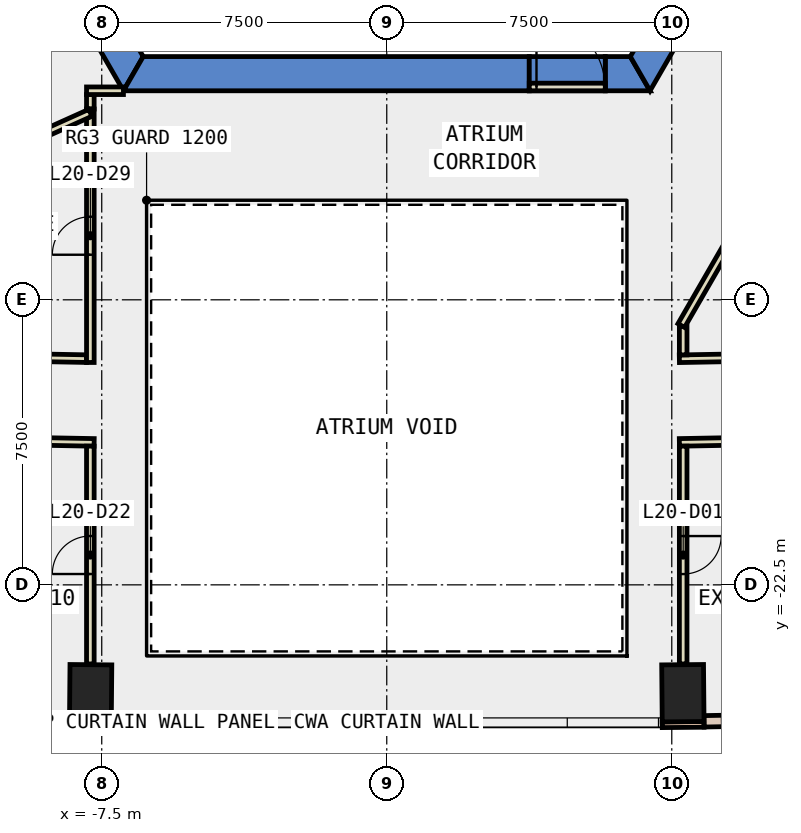
"""IFC4 building model, lengths in metres.
Left out: names, types, materials, properties, quantities, classifications, styles, units other than length and angle.
Written with IfcOpenShell. Run it as: python <this file> out.ifc"""

import sys

from ifc_helpers import new_model, si_unit, direction, frame, frame_2d, origin, origin_2d, place, context, subcontext, project, spatial, polyline, rectangle, outline, extrude, element, fill, save


model = new_model("IFC4")
c1 = context("Model", 3, precision=1e-05, world=origin(), true_north=direction((0.0, 1.0)))
c2 = subcontext(c1, "Body", "Model", "MODEL_VIEW")
j1 = project(units=[si_unit("LENGTHUNIT", "METRE"), si_unit("PLANEANGLEUNIT", "RADIAN")], contexts=[c1])
p1 = place(None, origin())
s1 = spatial("IfcSite", under=j1, at=p1, CompositionType="ELEMENT")
p2 = place(p1, origin())
s2 = spatial("IfcBuilding", under=s1, at=p2, CompositionType="ELEMENT")
p3 = place(p2, frame((0.0, 0.0, 95.0)))
s3 = spatial("IfcBuildingStorey", under=s2, at=p3, CompositionType="ELEMENT", Elevation=95.0)
for number, where, z_axis, x_axis in (
    (1, (-7.792, -25.351, -0.4), (0.0, 0.0, 1.0), (-1.0, 0.009, 0.0)),
    (2, (7.792, -25.351, -0.4), (0.0, 0.0, 1.0), (1.0, 0.009, 0.0)),
):
    element("IfcColumn", number, at=place(p3, frame(where, z_axis=z_axis, x_axis=x_axis)), inside=s3, PredefinedType="COLUMN", context=c2, shape_type="SweptSolid", body=[
        extrude(rectangle(XDim=1.1, YDim=1.5, at=origin_2d()), origin(), (0.0, 0.0, 1.0), 4.2),
    ])
p4 = place(p3, frame((0.0, 0.0, -0.4)))
e3 = element("IfcWall", 3, at=p4, inside=s3, PredefinedType="SHEAR", context=c2, shape_type="SweptSolid", body=[
    extrude(outline(polyline([(-13.856, 2.5), (-6.928, -9.5), (-6.409, -8.6), (-12.817, 2.5), (-13.856, 2.5)])), origin(), (0.0, 0.0, 1.0), 4.2),
])
p5 = place(p3, frame((0.0, 0.0, -0.4)))
e4 = element("IfcWall", 4, at=p5, inside=s3, PredefinedType="SHEAR", context=c2, shape_type="SweptSolid", body=[
    extrude(outline(polyline([(3.75, -9.5), (3.75, -8.6), (-6.409, -8.6), (-6.928, -9.5), (3.75, -9.5)])), origin(), (0.0, 0.0, 1.0), 4.2),
])
p6 = place(p3, frame((0.0, 0.0, -0.4)))
e5 = element("IfcWall", 5, at=p6, inside=s3, PredefinedType="SHEAR", context=c2, shape_type="SweptSolid", body=[
    extrude(outline(polyline([(5.75, -8.6), (5.75, -9.5), (6.928, -9.5), (6.409, -8.6), (5.75, -8.6)])), origin(), (0.0, 0.0, 1.0), 4.2),
])
p7 = place(p3, frame((0.0, 0.0, 3.6)))
e6 = element("IfcWall", 6, at=p7, inside=s3, PredefinedType="SHEAR", context=c2, shape_type="SweptSolid", body=[
    extrude(outline(polyline([(5.75, -9.5), (5.75, -8.6), (3.75, -8.6), (3.75, -9.5), (5.75, -9.5)])), origin(), (0.0, 0.0, 1.0), 0.2),
])
p8 = place(p3, frame((0.0, 0.0, -0.4)))
e7 = element("IfcWall", 7, at=p8, inside=s3, PredefinedType="SHEAR", context=c2, shape_type="SweptSolid", body=[
    extrude(outline(polyline([(8.117, -7.44), (7.338, -6.99), (6.409, -8.6), (6.928, -9.5), (8.117, -7.44)])), origin(), (0.0, 0.0, 1.0), 4.2),
])
for number, where, z_axis, x_axis in (
    (8, (-8.349, -26.171, 0.0), (0.0, 0.0, 1.0), (1.0, -0.009, 0.0)),
    (9, (7.249, -26.181, 0.0), (0.0, 0.0, 1.0), (1.0, 0.009, 0.0)),
):
    element("IfcWall", number, at=place(p3, frame(where, z_axis=z_axis, x_axis=x_axis)), inside=s3, PredefinedType="STANDARD", context=c2, shape_type="SweptSolid", body=[
        extrude(rectangle(XDim=1.1, YDim=0.15, at=frame_2d((0.55, 0.0))), origin(), (0.0, 0.0, 1.0), 3.8),
    ])
p9 = place(p3, frame((-14.242, -25.982, 0.0), z_axis=(0.0, 0.0, 1.0), x_axis=(0.999828633111, -0.018512277318, 0.0)))
e10 = element("IfcWall", 10, at=p9, inside=s3, PredefinedType="STANDARD", context=c2, shape_type="SweptSolid", body=[
    extrude(rectangle(XDim=5.895, YDim=0.3, at=frame_2d((2.948, 0.0))), origin(), (0.0, 0.0, 1.0), 3.8),
])
p10 = place(p9, frame((0.474, 0.0, 0.9)))
e11 = element("IfcOpeningElement", 11, at=p10, cuts=e10, PredefinedType="OPENING", context=c2, shape_type="SweptSolid", body=[
    extrude(rectangle(XDim=2.0, YDim=2.6, at=frame_2d((1.0, 1.3))), frame((0.0, 0.16, 0.0), z_axis=(0.0, -1.0, 0.0), x_axis=(1.0, 0.0, 0.0)), (0.0, 0.0, 1.0), 0.32),
])
p11 = place(p9, frame((3.421, 0.0, 0.9)))
e12 = element("IfcOpeningElement", 12, at=p11, cuts=e10, PredefinedType="OPENING", context=c2, shape_type="SweptSolid", body=[
    extrude(rectangle(XDim=2.0, YDim=2.6, at=frame_2d((1.0, 1.3))), frame((0.0, 0.16, 0.0), z_axis=(0.0, -1.0, 0.0), x_axis=(1.0, 0.0, 0.0)), (0.0, 0.0, 1.0), 0.32),
])
p12 = place(p3, frame((8.348, -26.091, 0.0), z_axis=(0.0, 0.0, 1.0), x_axis=(0.999828633111, 0.018512277318, 0.0)))
e13 = element("IfcWall", 13, at=p12, inside=s3, PredefinedType="STANDARD", context=c2, shape_type="SweptSolid", body=[
    extrude(rectangle(XDim=5.895, YDim=0.3, at=frame_2d((2.948, 0.0))), origin(), (0.0, 0.0, 1.0), 3.8),
])
p13 = place(p12, frame((0.474, 0.0, 0.9)))
e14 = element("IfcOpeningElement", 14, at=p13, cuts=e13, PredefinedType="OPENING", context=c2, shape_type="SweptSolid", body=[
    extrude(rectangle(XDim=2.0, YDim=2.6, at=frame_2d((1.0, 1.3))), frame((0.0, 0.16, 0.0), z_axis=(0.0, -1.0, 0.0), x_axis=(1.0, 0.0, 0.0)), (0.0, 0.0, 1.0), 0.32),
])
p14 = place(p12, frame((3.421, 0.0, 0.9)))
e15 = element("IfcOpeningElement", 15, at=p14, cuts=e13, PredefinedType="OPENING", context=c2, shape_type="SweptSolid", body=[
    extrude(rectangle(XDim=2.0, YDim=2.6, at=frame_2d((1.0, 1.3))), frame((0.0, 0.16, 0.0), z_axis=(0.0, -1.0, 0.0), x_axis=(1.0, 0.0, 0.0)), (0.0, 0.0, 1.0), 0.32),
])
p15 = place(p3, frame((7.7, -16.551, 0.0), z_axis=(0.0, 0.0, 1.0), x_axis=(0.999831478914, 0.018357934851, 0.0)))
e16 = element("IfcWall", 16, at=p15, inside=s3, PredefinedType="PARTITIONING", context=c2, shape_type="SweptSolid", body=[
    extrude(rectangle(XDim=6.862, YDim=0.2, at=frame_2d((3.431, 0.0))), origin(), (0.0, 0.0, 1.0), 3.8),
])
p16 = place(p3, frame((-10.408, -16.501, 0.0), z_axis=(0.0, 0.0, 1.0), x_axis=(0.999823568917, -0.018783797216, 0.0)))
e17 = element("IfcWall", 17, at=p16, inside=s3, PredefinedType="PARTITIONING", context=c2, shape_type="SweptSolid", body=[
    extrude(rectangle(XDim=2.509, YDim=0.2, at=frame_2d((1.254, 0.0))), origin(), (0.0, 0.0, 1.0), 3.8),
])
p17 = place(p3, frame((14.689, -18.623, 0.0), z_axis=(0.0, 0.0, 1.0), x_axis=(-0.99982995049, -0.01844098976, 0.0)))
e18 = element("IfcWall", 18, at=p17, inside=s3, PredefinedType="PARTITIONING", context=c2, shape_type="SweptSolid", body=[
    extrude(rectangle(XDim=6.99, YDim=0.2, at=frame_2d((3.495, 0.0))), origin(), (0.0, 0.0, 1.0), 3.8),
])
p18 = place(p3, frame((-7.7, -18.752, 0.0), z_axis=(0.0, 0.0, 1.0), x_axis=(-0.999830394604, 0.018416895142, 0.0)))
e19 = element("IfcWall", 19, at=p18, inside=s3, PredefinedType="PARTITIONING", context=c2, shape_type="SweptSolid", body=[
    extrude(rectangle(XDim=6.84, YDim=0.2, at=frame_2d((3.42, 0.0))), origin(), (0.0, 0.0, 1.0), 3.8),
])
p19 = place(p3, frame((7.8, -15.69, 0.0), z_axis=(0.0, 0.0, 1.0), x_axis=(0.0, -1.0, 0.0)))
e20 = element("IfcWall", 20, at=p19, inside=s3, PredefinedType="PARTITIONING", context=c2, shape_type="SweptSolid", body=[
    extrude(rectangle(XDim=0.759, YDim=0.2, at=frame_2d((0.379, 0.0))), origin(), (0.0, 0.0, 1.0), 3.8),
])
p20 = place(p3, frame((-7.8, -9.98, 0.0), z_axis=(0.0, 0.0, 1.0), x_axis=(0.0, 1.0, 0.0)))
e21 = element("IfcWall", 21, at=p20, inside=s3, PredefinedType="PARTITIONING", context=c2, shape_type="SweptSolid", body=[
    extrude(rectangle(XDim=0.381, YDim=0.2, at=frame_2d((0.19, 0.0))), origin(), (0.0, 0.0, 1.0), 3.8),
])
p21 = place(p3, frame((-7.9, -9.499, 0.0), z_axis=(0.0, 0.0, 1.0), x_axis=(1.0, 0.0, 0.0)))
e22 = element("IfcWall", 22, at=p21, inside=s3, PredefinedType="PARTITIONING", context=c2, shape_type="SweptSolid", body=[
    extrude(rectangle(XDim=0.971, YDim=0.2, at=frame_2d((0.485, 0.0))), origin(), (0.0, 0.0, 1.0), 3.8),
])
p22 = place(p3, frame((-7.8, -16.649, 0.0), z_axis=(0.0, 0.0, 1.0), x_axis=(0.0, 1.0, 0.0)))
e23 = element("IfcWall", 23, at=p22, inside=s3, PredefinedType="PARTITIONING", context=c2, shape_type="SweptSolid", body=[
    extrude(rectangle(XDim=6.669, YDim=0.2, at=frame_2d((3.334, 0.0))), origin(), (0.0, 0.0, 1.0), 3.8),
])
p23 = place(p22, frame((2.835, 0.0, 0.0)))
e24 = element("IfcOpeningElement", 24, at=p23, cuts=e23, PredefinedType="OPENING", context=c2, shape_type="SweptSolid", body=[
    extrude(rectangle(XDim=1.0, YDim=2.1, at=frame_2d((0.5, 1.05))), frame((0.0, 0.11, 0.0), z_axis=(0.0, -1.0, 0.0), x_axis=(1.0, 0.0, 0.0)), (0.0, 0.0, 1.0), 0.22),
])
p24 = place(p3, frame((7.8, -18.85, 0.0), z_axis=(0.0, 0.0, 1.0), x_axis=(0.0, -1.0, 0.0)))
e25 = element("IfcWall", 25, at=p24, inside=s3, PredefinedType="PARTITIONING", context=c2, shape_type="SweptSolid", body=[
    extrude(rectangle(XDim=5.731, YDim=0.2, at=frame_2d((2.865, 0.0))), origin(), (0.0, 0.0, 1.0), 3.8),
])
p25 = place(p24, frame((2.366, 0.0, 0.0)))
e26 = element("IfcOpeningElement", 26, at=p25, cuts=e25, PredefinedType="OPENING", context=c2, shape_type="SweptSolid", body=[
    extrude(rectangle(XDim=1.0, YDim=2.1, at=frame_2d((0.5, 1.05))), frame((0.0, 0.11, 0.0), z_axis=(0.0, -1.0, 0.0), x_axis=(1.0, 0.0, 0.0)), (0.0, 0.0, 1.0), 0.22),
])
p26 = place(p3, frame((-7.8, -24.581, 0.0), z_axis=(0.0, 0.0, 1.0), x_axis=(0.0, 1.0, 0.0)))
e27 = element("IfcWall", 27, at=p26, inside=s3, PredefinedType="PARTITIONING", context=c2, shape_type="SweptSolid", body=[
    extrude(rectangle(XDim=5.731, YDim=0.2, at=frame_2d((2.865, 0.0))), origin(), (0.0, 0.0, 1.0), 3.8),
])
p27 = place(p26, frame((2.366, 0.0, 0.0)))
e28 = element("IfcOpeningElement", 28, at=p27, cuts=e27, PredefinedType="OPENING", context=c2, shape_type="SweptSolid", body=[
    extrude(rectangle(XDim=1.0, YDim=2.1, at=frame_2d((0.5, 1.05))), frame((0.0, 0.11, 0.0), z_axis=(0.0, -1.0, 0.0), x_axis=(1.0, 0.0, 0.0)), (0.0, 0.0, 1.0), 0.22),
])
p28 = place(p3, frame((-7.8, -10.08, 0.0), z_axis=(0.0, 0.0, 1.0), x_axis=(-0.911938383636, -0.410327167577, 0.0)))
e29 = element("IfcWall", 29, at=p28, inside=s3, PredefinedType="PARTITIONING", context=c2, shape_type="SweptSolid", body=[
    extrude(rectangle(XDim=5.683, YDim=0.2, at=frame_2d((2.842, 0.0))), origin(), (0.0, 0.0, 1.0), 3.8),
])
p29 = place(p3, frame((3.75, -9.4, 0.0), z_axis=(0.0, 0.0, 1.0), x_axis=(1.0, 0.0, 0.0)))
e30 = element("IfcWall", 30, at=p29, inside=s3, PredefinedType="PARTITIONING", context=c2, shape_type="SweptSolid", body=[
    extrude(rectangle(XDim=2.0, YDim=0.2, at=frame_2d((1.0, 0.0))), origin(), (0.0, 0.0, 1.0), 2.4),
])
p30 = place(p29, frame((0.19, 0.0, 0.0)))
e31 = element("IfcOpeningElement", 31, at=p30, cuts=e30, PredefinedType="OPENING", context=c2, shape_type="SweptSolid", body=[
    extrude(rectangle(XDim=1.8, YDim=2.1, at=frame_2d((0.9, 1.05))), frame((0.0, 0.11, 0.0), z_axis=(0.0, -1.0, 0.0), x_axis=(1.0, 0.0, 0.0)), (0.0, 0.0, 1.0), 0.22),
])
p31 = place(p3, frame((12.401, -7.621, 0.0), z_axis=(0.0, 0.0, 1.0), x_axis=(-0.499983724212, -0.866034800411, 0.0)))
e32 = element("IfcWall", 32, at=p31, inside=s3, PredefinedType="PARTITIONING", context=c2, shape_type="SweptSolid", body=[
    extrude(rectangle(XDim=9.302, YDim=0.2, at=frame_2d((4.651, 0.0))), origin(), (0.0, 0.0, 1.0), 3.8),
])
p32 = place(p25, origin())
e33 = element("IfcDoor", 33, at=p32, inside=s3, OperationType="SINGLE_SWING_LEFT", PredefinedType="DOOR", context=c2, shape_type="SweptSolid", body=[
    extrude(rectangle(XDim=1.0, YDim=2.1, at=frame_2d((0.5, 1.05))), frame((0.0, 0.025, 0.0), z_axis=(0.0, -1.0, 0.0), x_axis=(1.0, 0.0, 0.0)), (0.0, 0.0, 1.0), 0.05),
])
fill(e26, e33)
p33 = place(p27, origin())
e34 = element("IfcDoor", 34, at=p33, inside=s3, OperationType="SINGLE_SWING_LEFT", PredefinedType="DOOR", context=c2, shape_type="SweptSolid", body=[
    extrude(rectangle(XDim=1.0, YDim=2.1, at=frame_2d((0.5, 1.05))), frame((0.0, 0.025, 0.0), z_axis=(0.0, -1.0, 0.0), x_axis=(1.0, 0.0, 0.0)), (0.0, 0.0, 1.0), 0.05),
])
fill(e28, e34)
p34 = place(p23, origin())
e35 = element("IfcDoor", 35, at=p34, inside=s3, OperationType="SINGLE_SWING_LEFT", PredefinedType="DOOR", context=c2, shape_type="SweptSolid", body=[
    extrude(rectangle(XDim=1.0, YDim=2.1, at=frame_2d((0.5, 1.05))), frame((0.0, 0.025, 0.0), z_axis=(0.0, -1.0, 0.0), x_axis=(1.0, 0.0, 0.0)), (0.0, 0.0, 1.0), 0.05),
])
fill(e24, e35)
p35 = place(p30, origin())
e36 = element("IfcDoor", 36, at=p35, inside=s3, OperationType="DOUBLE_DOOR_SINGLE_SWING", PredefinedType="DOOR", context=c2, shape_type="SweptSolid", body=[
    extrude(rectangle(XDim=1.8, YDim=2.1, at=frame_2d((0.9, 1.05))), frame((0.0, 0.025, 0.0), z_axis=(0.0, -1.0, 0.0), x_axis=(1.0, 0.0, 0.0)), (0.0, 0.0, 1.0), 0.05),
])
fill(e31, e36)
save(model, sys.argv[1])
